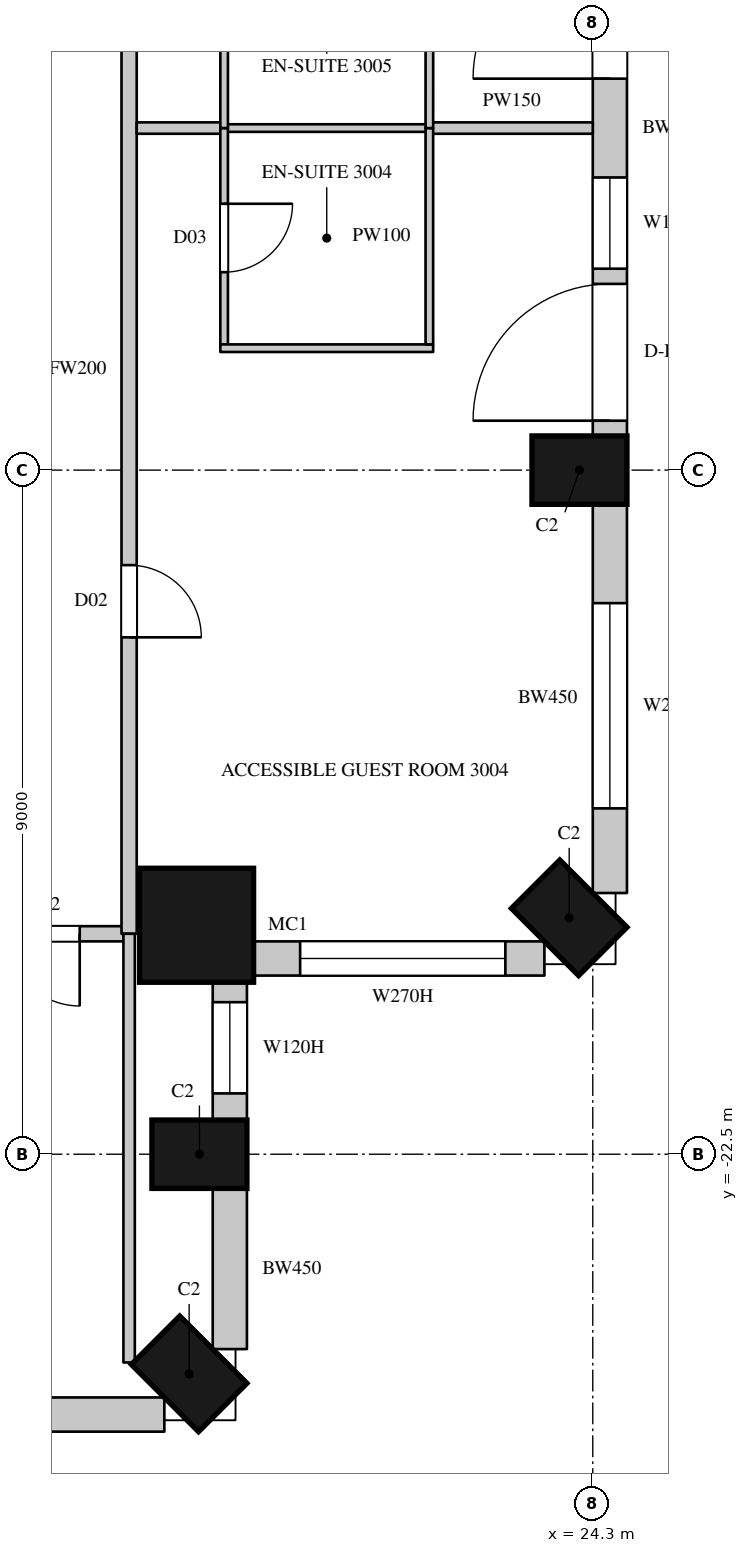
"""IFC4 building model, lengths in metres.
Left out: names, types, materials, properties, quantities, classifications, styles, units other than length and angle.
Written with IfcOpenShell. Run it as: python <this file> out.ifc"""

import sys

from ifc_helpers import new_model, si_unit, direction, frame, frame_2d, origin, origin_2d, place, context, subcontext, project, spatial, rectangle, circle, extrude, element, fill, save


model = new_model("IFC4")
c1 = context("Model", 3, precision=1e-05, world=origin(), true_north=direction((0.0, 1.0)))
c2 = subcontext(c1, "Body", "Model", "MODEL_VIEW")
j1 = project(units=[si_unit("LENGTHUNIT", "METRE"), si_unit("PLANEANGLEUNIT", "RADIAN")], contexts=[c1])
p1 = place(None, origin())
s1 = spatial("IfcSite", under=j1, at=p1, CompositionType="ELEMENT")
p2 = place(p1, origin())
s2 = spatial("IfcBuilding", under=s1, at=p2, CompositionType="ELEMENT")
p3 = place(p2, frame((0.0, 0.0, 138.3)))
s3 = spatial("IfcBuildingStorey", under=s2, at=p3, CompositionType="ELEMENT", Elevation=138.3)
for number, where, z_axis, x_axis in (
    (1, (18.99, -25.39, 0.0), (0.0, 0.0, 1.0), (0.707, 0.707, 0.0)),
    (2, (19.125, -22.5, 0.0), (0.0, 0.0, 1.0), (0.0, 1.0, 0.0)),
):
    element("IfcColumn", number, at=place(p3, frame(where, z_axis=z_axis, x_axis=x_axis)), inside=s3, PredefinedType="COLUMN", context=c2, shape_type="SweptSolid", body=[
        extrude(rectangle(XDim=0.9, YDim=1.25, at=origin_2d()), origin(), (0.0, 0.0, 1.0), 3.6),
    ])
p4 = place(p3, frame((19.088, -19.488, 0.0), z_axis=(0.0, 0.0, 1.0), x_axis=(1.0, 0.0, 0.0)))
e3 = element("IfcColumn", 3, at=p4, inside=s3, PredefinedType="COLUMN", context=c2, shape_type="SweptSolid", body=[
    extrude(circle(Radius=0.75, at=origin_2d()), origin(), (0.0, 0.0, 1.0), 3.6),
])
for number, where, z_axis, x_axis in (
    (4, (23.99, -19.39, 0.0), (0.0, 0.0, 1.0), (0.707, 0.707, 0.0)),
    (5, (24.125, -13.5, 0.0), (0.0, 0.0, 1.0), (0.0, 1.0, 0.0)),
):
    element("IfcColumn", number, at=place(p3, frame(where, z_axis=z_axis, x_axis=x_axis)), inside=s3, PredefinedType="COLUMN", context=c2, shape_type="SweptSolid", body=[
        extrude(rectangle(XDim=0.9, YDim=1.25, at=origin_2d()), origin(), (0.0, 0.0, 1.0), 3.6),
    ])
p5 = place(p3, frame((15.75, -25.925, 0.0), z_axis=(0.0, 0.0, 1.0), x_axis=(1.0, 0.0, 0.0)))
e6 = element("IfcWall", 6, at=p5, inside=s3, PredefinedType="SOLIDWALL", context=c2, shape_type="SweptSolid", body=[
    extrude(rectangle(XDim=2.914, YDim=0.45, at=frame_2d((1.457, 0.0))), origin(), (0.0, 0.0, 1.0), 3.3),
])
p6 = place(p3, frame((19.525, -25.064, 0.0), z_axis=(0.0, 0.0, 1.0), x_axis=(0.0, 1.0, 0.0)))
e7 = element("IfcWall", 7, at=p6, inside=s3, PredefinedType="SOLIDWALL", context=c2, shape_type="SweptSolid", body=[
    extrude(rectangle(XDim=2.114, YDim=0.45, at=frame_2d((1.057, 0.0))), origin(), (0.0, 0.0, 1.0), 3.3),
])
p7 = place(p3, frame((19.525, -22.05, 0.0), z_axis=(0.0, 0.0, 1.0), x_axis=(0.0, 1.0, 0.0)))
e8 = element("IfcWall", 8, at=p7, inside=s3, PredefinedType="SOLIDWALL", context=c2, shape_type="SweptSolid", body=[
    extrude(rectangle(XDim=1.843, YDim=0.45, at=frame_2d((0.921, 0.0))), origin(), (0.0, 0.0, 1.0), 3.3),
])
p8 = place(p7, frame((0.35, 0.0, 1.05)))
e9 = element("IfcOpeningElement", 9, at=p8, cuts=e8, PredefinedType="OPENING", context=c2, shape_type="SweptSolid", body=[
    extrude(rectangle(XDim=1.2, YDim=2.0, at=frame_2d((0.6, 1.0))), frame((0.0, 0.235, 0.0), z_axis=(0.0, -1.0, 0.0), x_axis=(1.0, 0.0, 0.0)), (0.0, 0.0, 1.0), 0.47),
])
p9 = place(p3, frame((19.807, -19.925, 0.0), z_axis=(0.0, 0.0, 1.0), x_axis=(1.0, 0.0, 0.0)))
e10 = element("IfcWall", 10, at=p9, inside=s3, PredefinedType="SOLIDWALL", context=c2, shape_type="SweptSolid", body=[
    extrude(rectangle(XDim=3.857, YDim=0.45, at=frame_2d((1.928, 0.0))), origin(), (0.0, 0.0, 1.0), 3.3),
])
p10 = place(p9, frame((0.643, 0.0, 1.05)))
e11 = element("IfcOpeningElement", 11, at=p10, cuts=e10, PredefinedType="OPENING", context=c2, shape_type="SweptSolid", body=[
    extrude(rectangle(XDim=2.7, YDim=2.0, at=frame_2d((1.35, 1.0))), frame((0.0, 0.235, 0.0), z_axis=(0.0, -1.0, 0.0), x_axis=(1.0, 0.0, 0.0)), (0.0, 0.0, 1.0), 0.47),
])
p11 = place(p3, frame((24.525, -19.064, 0.0), z_axis=(0.0, 0.0, 1.0), x_axis=(0.0, 1.0, 0.0)))
e12 = element("IfcWall", 12, at=p11, inside=s3, PredefinedType="SOLIDWALL", context=c2, shape_type="SweptSolid", body=[
    extrude(rectangle(XDim=5.114, YDim=0.45, at=frame_2d((2.557, 0.0))), origin(), (0.0, 0.0, 1.0), 3.3),
])
p12 = place(p11, frame((1.114, 0.0, 1.05)))
e13 = element("IfcOpeningElement", 13, at=p12, cuts=e12, PredefinedType="OPENING", context=c2, shape_type="SweptSolid", body=[
    extrude(rectangle(XDim=2.7, YDim=2.0, at=frame_2d((1.35, 1.0))), frame((0.0, 0.235, 0.0), z_axis=(0.0, -1.0, 0.0), x_axis=(1.0, 0.0, 0.0)), (0.0, 0.0, 1.0), 0.47),
])
p13 = place(p3, frame((24.525, -13.05, 0.0), z_axis=(0.0, 0.0, 1.0), x_axis=(0.0, 1.0, 0.0)))
e14 = element("IfcWall", 14, at=p13, inside=s3, PredefinedType="SOLIDWALL", context=c2, shape_type="SweptSolid", body=[
    extrude(rectangle(XDim=8.1, YDim=0.45, at=frame_2d((4.05, 0.0))), origin(), (0.0, 0.0, 1.0), 3.3),
])
p14 = place(p13, frame((0.2, 0.0, 0.0)))
e15 = element("IfcOpeningElement", 15, at=p14, cuts=e14, PredefinedType="OPENING", context=c2, shape_type="SweptSolid", body=[
    extrude(rectangle(XDim=1.8, YDim=2.4, at=frame_2d((0.9, 1.2))), frame((0.0, 0.235, 0.0), z_axis=(0.0, -1.0, 0.0), x_axis=(1.0, 0.0, 0.0)), (0.0, 0.0, 1.0), 0.47),
])
p15 = place(p13, frame((2.2, 0.0, 1.05)))
e16 = element("IfcOpeningElement", 16, at=p15, cuts=e14, PredefinedType="OPENING", context=c2, shape_type="SweptSolid", body=[
    extrude(rectangle(XDim=1.2, YDim=2.0, at=frame_2d((0.6, 1.0))), frame((0.0, 0.235, 0.0), z_axis=(0.0, -1.0, 0.0), x_axis=(1.0, 0.0, 0.0)), (0.0, 0.0, 1.0), 0.47),
])
p16 = place(p13, frame((4.7, 0.0, 0.0)))
e17 = element("IfcOpeningElement", 17, at=p16, cuts=e14, PredefinedType="OPENING", context=c2, shape_type="SweptSolid", body=[
    extrude(rectangle(XDim=1.8, YDim=2.4, at=frame_2d((0.9, 1.2))), frame((0.0, 0.235, 0.0), z_axis=(0.0, -1.0, 0.0), x_axis=(1.0, 0.0, 0.0)), (0.0, 0.0, 1.0), 0.47),
])
p17 = place(p13, frame((6.7, 0.0, 1.05)))
e18 = element("IfcOpeningElement", 18, at=p17, cuts=e14, PredefinedType="OPENING", context=c2, shape_type="SweptSolid", body=[
    extrude(rectangle(XDim=1.2, YDim=2.0, at=frame_2d((0.6, 1.0))), frame((0.0, 0.235, 0.0), z_axis=(0.0, -1.0, 0.0), x_axis=(1.0, 0.0, 0.0)), (0.0, 0.0, 1.0), 0.47),
])
p18 = place(p3, frame((-20.7, -19.6, 0.0), z_axis=(0.0, 0.0, 1.0), x_axis=(1.0, 0.0, 0.0)))
e19 = element("IfcWall", 19, at=p18, inside=s3, PredefinedType="PARTITIONING", context=c2, shape_type="SweptSolid", body=[
    extrude(rectangle(XDim=38.825, YDim=0.2, at=frame_2d((19.413, 0.0))), origin(), (0.0, 0.0, 1.0), 3.3),
])
p19 = place(p18, frame((3.15, 0.0, 0.0)))
e20 = element("IfcOpeningElement", 20, at=p19, cuts=e19, PredefinedType="OPENING", context=c2, shape_type="SweptSolid", body=[
    extrude(rectangle(XDim=1.1, YDim=2.4, at=frame_2d((0.55, 1.2))), frame((0.0, 0.11, 0.0), z_axis=(0.0, -1.0, 0.0), x_axis=(1.0, 0.0, 0.0)), (0.0, 0.0, 1.0), 0.22),
])
p20 = place(p18, frame((14.85, 0.0, 0.0)))
e21 = element("IfcOpeningElement", 21, at=p20, cuts=e19, PredefinedType="OPENING", context=c2, shape_type="SweptSolid", body=[
    extrude(rectangle(XDim=1.1, YDim=2.4, at=frame_2d((0.55, 1.2))), frame((0.0, 0.11, 0.0), z_axis=(0.0, -1.0, 0.0), x_axis=(1.0, 0.0, 0.0)), (0.0, 0.0, 1.0), 0.22),
])
p21 = place(p18, frame((23.85, 0.0, 0.0)))
e22 = element("IfcOpeningElement", 22, at=p21, cuts=e19, PredefinedType="OPENING", context=c2, shape_type="SweptSolid", body=[
    extrude(rectangle(XDim=1.1, YDim=2.4, at=frame_2d((0.55, 1.2))), frame((0.0, 0.11, 0.0), z_axis=(0.0, -1.0, 0.0), x_axis=(1.0, 0.0, 0.0)), (0.0, 0.0, 1.0), 0.22),
])
p22 = place(p18, frame((37.3, 0.0, 0.0)))
e23 = element("IfcOpeningElement", 23, at=p22, cuts=e19, PredefinedType="OPENING", context=c2, shape_type="SweptSolid", body=[
    extrude(rectangle(XDim=0.95, YDim=2.2, at=frame_2d((0.475, 1.1))), frame((0.0, 0.11, 0.0), z_axis=(0.0, -1.0, 0.0), x_axis=(1.0, 0.0, 0.0)), (0.0, 0.0, 1.0), 0.22),
])
p23 = place(p3, frame((18.2, -19.6, 0.0), z_axis=(0.0, 0.0, 1.0), x_axis=(0.0, 1.0, 0.0)))
e24 = element("IfcWall", 24, at=p23, inside=s3, PredefinedType="PARTITIONING", context=c2, shape_type="SweptSolid", body=[
    extrude(rectangle(XDim=14.85, YDim=0.2, at=frame_2d((7.425, 0.0))), origin(), (0.0, 0.0, 1.0), 3.3),
])
p24 = place(p23, frame((3.9, 0.0, 0.0)))
e25 = element("IfcOpeningElement", 25, at=p24, cuts=e24, PredefinedType="OPENING", context=c2, shape_type="SweptSolid", body=[
    extrude(rectangle(XDim=0.95, YDim=2.2, at=frame_2d((0.475, 1.1))), frame((0.0, 0.11, 0.0), z_axis=(0.0, -1.0, 0.0), x_axis=(1.0, 0.0, 0.0)), (0.0, 0.0, 1.0), 0.22),
])
p25 = place(p23, frame((13.5, 0.0, 0.0)))
e26 = element("IfcOpeningElement", 26, at=p25, cuts=e24, PredefinedType="OPENING", context=c2, shape_type="SweptSolid", body=[
    extrude(rectangle(XDim=0.95, YDim=2.2, at=frame_2d((0.475, 1.1))), frame((0.0, 0.11, 0.0), z_axis=(0.0, -1.0, 0.0), x_axis=(1.0, 0.0, 0.0)), (0.0, 0.0, 1.0), 0.22),
])
p26 = place(p3, frame((18.2, -25.24, 0.0), z_axis=(0.0, 0.0, 1.0), x_axis=(0.0, 1.0, 0.0)))
e27 = element("IfcWall", 27, at=p26, inside=s3, PredefinedType="PARTITIONING", context=c2, shape_type="SweptSolid", body=[
    extrude(rectangle(XDim=5.64, YDim=0.15, at=frame_2d((2.82, 0.0))), origin(), (0.0, 0.0, 1.0), 3.3),
])
p27 = place(p3, frame((18.3, -9.0, 0.0), z_axis=(0.0, 0.0, 1.0), x_axis=(1.0, 0.0, 0.0)))
e28 = element("IfcWall", 28, at=p27, inside=s3, PredefinedType="PARTITIONING", context=c2, shape_type="SweptSolid", body=[
    extrude(rectangle(XDim=1.13, YDim=0.15, at=frame_2d((0.565, 0.0))), origin(), (0.0, 0.0, 1.0), 2.65),
])
p28 = place(p3, frame((22.17, -9.0, 0.0), z_axis=(0.0, 0.0, 1.0), x_axis=(1.0, 0.0, 0.0)))
e29 = element("IfcWall", 29, at=p28, inside=s3, PredefinedType="PARTITIONING", context=c2, shape_type="SweptSolid", body=[
    extrude(rectangle(XDim=2.13, YDim=0.15, at=frame_2d((1.065, 0.0))), origin(), (0.0, 0.0, 1.0), 2.65),
])
p29 = place(p3, frame((19.43, -9.0, 0.0), z_axis=(0.0, 0.0, 1.0), x_axis=(1.0, 0.0, 0.0)))
e30 = element("IfcWall", 30, at=p29, inside=s3, PredefinedType="PARTITIONING", context=c2, shape_type="SweptSolid", body=[
    extrude(rectangle(XDim=2.74, YDim=0.1, at=frame_2d((1.37, 0.0))), origin(), (0.0, 0.0, 1.0), 2.65),
])
p30 = place(p3, frame((19.45, -11.846, 0.0), z_axis=(0.0, 0.0, 1.0), x_axis=(0.0, 1.0, 0.0)))
e31 = element("IfcWall", 31, at=p30, inside=s3, PredefinedType="PARTITIONING", context=c2, shape_type="SweptSolid", body=[
    extrude(rectangle(XDim=2.846, YDim=0.1, at=frame_2d((1.423, 0.0))), origin(), (0.0, 0.0, 1.0), 3.3),
])
p31 = place(p30, frame((0.95, 0.0, 0.0)))
e32 = element("IfcOpeningElement", 32, at=p31, cuts=e31, PredefinedType="OPENING", context=c2, shape_type="SweptSolid", body=[
    extrude(rectangle(XDim=0.9, YDim=2.2, at=frame_2d((0.45, 1.1))), frame((0.0, 0.06, 0.0), z_axis=(0.0, -1.0, 0.0), x_axis=(1.0, 0.0, 0.0)), (0.0, 0.0, 1.0), 0.12),
])
p32 = place(p3, frame((19.4, -11.896, 0.0), z_axis=(0.0, 0.0, 1.0), x_axis=(1.0, 0.0, 0.0)))
e33 = element("IfcWall", 33, at=p32, inside=s3, PredefinedType="PARTITIONING", context=c2, shape_type="SweptSolid", body=[
    extrude(rectangle(XDim=2.8, YDim=0.1, at=frame_2d((1.4, 0.0))), origin(), (0.0, 0.0, 1.0), 3.3),
])
p33 = place(p3, frame((19.45, -9.0, 0.0), z_axis=(0.0, 0.0, 1.0), x_axis=(0.000399241409, 0.999999920303, 0.0)))
e34 = element("IfcWall", 34, at=p33, inside=s3, PredefinedType="PARTITIONING", context=c2, shape_type="SweptSolid", body=[
    extrude(rectangle(XDim=2.446, YDim=0.1, at=frame_2d((1.223, 0.0))), origin(), (0.0, 0.0, 1.0), 3.3),
])
p34 = place(p33, frame((1.3, 0.0, 0.0)))
e35 = element("IfcOpeningElement", 35, at=p34, cuts=e34, PredefinedType="OPENING", context=c2, shape_type="SweptSolid", body=[
    extrude(rectangle(XDim=0.9, YDim=2.2, at=frame_2d((0.45, 1.1))), frame((0.0, 0.06, 0.0), z_axis=(0.0, -1.0, 0.0), x_axis=(1.0, 0.0, 0.0)), (0.0, 0.0, 1.0), 0.12),
])
p35 = place(p3, frame((22.15, -11.846, 0.0), z_axis=(0.0, 0.0, 1.0), x_axis=(0.0, 1.0, 0.0)))
e36 = element("IfcWall", 36, at=p35, inside=s3, PredefinedType="PARTITIONING", context=c2, shape_type="SweptSolid", body=[
    extrude(rectangle(XDim=2.846, YDim=0.1, at=frame_2d((1.423, 0.0))), origin(), (0.0, 0.0, 1.0), 3.3),
])
p36 = place(p3, frame((22.15, -9.0, 0.0), z_axis=(0.0, 0.0, 1.0), x_axis=(0.00041644973, 0.999999913285, 0.0)))
e37 = element("IfcWall", 37, at=p36, inside=s3, PredefinedType="PARTITIONING", context=c2, shape_type="SweptSolid", body=[
    extrude(rectangle(XDim=2.345, YDim=0.1, at=frame_2d((1.172, 0.0))), origin(), (0.0, 0.0, 1.0), 3.3),
])
p37 = place(p8, origin())
e38 = element("IfcWindow", 38, at=p37, inside=s3, PartitioningType="SINGLE_PANEL", PredefinedType="WINDOW", context=c2, shape_type="SweptSolid", body=[
    extrude(rectangle(XDim=1.2, YDim=2.0, at=frame_2d((0.6, 1.0))), frame((0.0, 0.135, 0.0), z_axis=(0.0, -1.0, 0.0), x_axis=(1.0, 0.0, 0.0)), (0.0, 0.0, 1.0), 0.06),
])
fill(e9, e38)
p38 = place(p10, origin())
e39 = element("IfcWindow", 39, at=p38, inside=s3, PartitioningType="SINGLE_PANEL", PredefinedType="WINDOW", context=c2, shape_type="SweptSolid", body=[
    extrude(rectangle(XDim=2.7, YDim=2.0, at=frame_2d((1.35, 1.0))), frame((0.0, 0.135, 0.0), z_axis=(0.0, -1.0, 0.0), x_axis=(1.0, 0.0, 0.0)), (0.0, 0.0, 1.0), 0.06),
])
fill(e11, e39)
p39 = place(p12, origin())
e40 = element("IfcWindow", 40, at=p39, inside=s3, PartitioningType="SINGLE_PANEL", PredefinedType="WINDOW", context=c2, shape_type="SweptSolid", body=[
    extrude(rectangle(XDim=2.7, YDim=2.0, at=frame_2d((1.35, 1.0))), frame((0.0, 0.135, 0.0), z_axis=(0.0, -1.0, 0.0), x_axis=(1.0, 0.0, 0.0)), (0.0, 0.0, 1.0), 0.06),
])
fill(e13, e40)
p40 = place(p14, origin())
e41 = element("IfcDoor", 41, at=p40, inside=s3, OperationType="SLIDING_TO_LEFT", PredefinedType="DOOR", context=c2, shape_type="SweptSolid", body=[
    extrude(rectangle(XDim=1.8, YDim=2.4, at=frame_2d((0.9, 1.2))), frame((0.0, 0.13, 0.0), z_axis=(0.0, -1.0, 0.0), x_axis=(1.0, 0.0, 0.0)), (0.0, 0.0, 1.0), 0.05),
])
fill(e15, e41)
p41 = place(p15, origin())
e42 = element("IfcWindow", 42, at=p41, inside=s3, PartitioningType="SINGLE_PANEL", PredefinedType="WINDOW", context=c2, shape_type="SweptSolid", body=[
    extrude(rectangle(XDim=1.2, YDim=2.0, at=frame_2d((0.6, 1.0))), frame((0.0, 0.135, 0.0), z_axis=(0.0, -1.0, 0.0), x_axis=(1.0, 0.0, 0.0)), (0.0, 0.0, 1.0), 0.06),
])
fill(e16, e42)
p42 = place(p16, origin())
e43 = element("IfcDoor", 43, at=p42, inside=s3, OperationType="SLIDING_TO_LEFT", PredefinedType="DOOR", context=c2, shape_type="SweptSolid", body=[
    extrude(rectangle(XDim=1.8, YDim=2.4, at=frame_2d((0.9, 1.2))), frame((0.0, 0.13, 0.0), z_axis=(0.0, -1.0, 0.0), x_axis=(1.0, 0.0, 0.0)), (0.0, 0.0, 1.0), 0.05),
])
fill(e17, e43)
p43 = place(p24, origin())
e44 = element("IfcDoor", 44, at=p43, inside=s3, OperationType="SINGLE_SWING_RIGHT", PredefinedType="DOOR", context=c2, shape_type="SweptSolid", body=[
    extrude(rectangle(XDim=0.95, YDim=2.2, at=frame_2d((0.475, 1.1))), frame((0.0, 0.025, 0.0), z_axis=(0.0, -1.0, 0.0), x_axis=(1.0, 0.0, 0.0)), (0.0, 0.0, 1.0), 0.05),
])
fill(e25, e44)
p44 = place(p31, origin())
e45 = element("IfcDoor", 45, at=p44, inside=s3, OperationType="SINGLE_SWING_LEFT", PredefinedType="DOOR", context=c2, shape_type="SweptSolid", body=[
    extrude(rectangle(XDim=0.9, YDim=2.2, at=frame_2d((0.45, 1.1))), frame((0.0, 0.025, 0.0), z_axis=(0.0, -1.0, 0.0), x_axis=(1.0, 0.0, 0.0)), (0.0, 0.0, 1.0), 0.05),
])
fill(e32, e45)
p45 = place(p22, origin())
e46 = element("IfcDoor", 46, at=p45, inside=s3, OperationType="SINGLE_SWING_LEFT", PredefinedType="DOOR", context=c2, shape_type="SweptSolid", body=[
    extrude(rectangle(XDim=0.95, YDim=2.2, at=frame_2d((0.475, 1.1))), frame((0.0, 0.025, 0.0), z_axis=(0.0, -1.0, 0.0), x_axis=(1.0, 0.0, 0.0)), (0.0, 0.0, 1.0), 0.05),
])
fill(e23, e46)
save(model, sys.argv[1])
